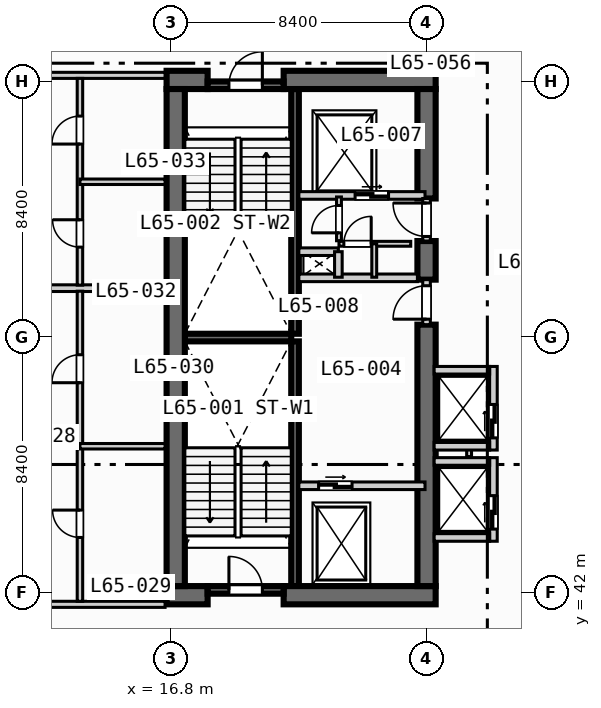
"""IFC4 building model, lengths in metres.
Left out: names, types, materials, properties, quantities, classifications, styles, units other than length and angle.
Written with IfcOpenShell. Run it as: python <this file> out.ifc"""

import sys

from ifc_helpers import new_model, si_unit, direction, frame, frame_2d, origin, place, context, subcontext, project, spatial, rectangle, extrude, element, fill, save


model = new_model("IFC4")
c1 = context("Model", 3, precision=1e-05, world=origin(), true_north=direction((0.0, 1.0)))
c2 = subcontext(c1, "Body", "Model", "MODEL_VIEW")
j1 = project(units=[si_unit("LENGTHUNIT", "METRE"), si_unit("PLANEANGLEUNIT", "RADIAN")], contexts=[c1])
p1 = place(None, origin())
s1 = spatial("IfcSite", under=j1, at=p1, CompositionType="ELEMENT")
p2 = place(p1, origin())
s2 = spatial("IfcBuilding", under=s1, at=p2, CompositionType="ELEMENT")
p3 = place(p2, frame((0.0, 0.0, 263.8)))
s3 = spatial("IfcBuildingStorey", under=s2, at=p3, CompositionType="ELEMENT", Elevation=263.8)
for number, where, z_axis, x_axis in (
    (1, (20.875, 42.2, 0.0), (0.0, 0.0, 1.0), (0.0, 1.0, 0.0)),
    (2, (20.875, 50.5, 0.0), (0.0, 0.0, 1.0), (0.0, 1.0, 0.0)),
):
    element("IfcWall", number, at=place(p3, frame(where, z_axis=z_axis, x_axis=x_axis)), inside=s3, PredefinedType="SOLIDWALL", context=c2, shape_type="SweptSolid", body=[
        extrude(rectangle(XDim=8.05, YDim=0.25, at=frame_2d((4.025, 0.0))), origin(), (0.0, 0.0, 1.0), 3.47),
    ])
p4 = place(p3, frame((17.25, 50.375, 0.0), z_axis=(0.0, 0.0, 1.0), x_axis=(1.0, 0.0, 0.0)))
e3 = element("IfcWall", 3, at=p4, inside=s3, PredefinedType="SOLIDWALL", context=c2, shape_type="SweptSolid", body=[
    extrude(rectangle(XDim=3.5, YDim=0.25, at=frame_2d((1.75, 0.0))), origin(), (0.0, 0.0, 1.0), 3.47),
])
p5 = place(p3, frame((16.65, 41.9, 0.0), z_axis=(0.0, 0.0, 1.0), x_axis=(1.0, 0.0, 0.0)))
e4 = element("IfcWall", 4, at=p5, inside=s3, PredefinedType="SHEAR", context=c2, shape_type="SweptSolid", body=[
    extrude(rectangle(XDim=1.35, YDim=0.6, at=frame_2d((0.675, 0.0))), origin(), (0.0, 0.0, 1.0), 3.47),
])
p6 = place(p3, frame((20.5, 41.9, 0.0), z_axis=(0.0, 0.0, 1.0), x_axis=(1.0, 0.0, 0.0)))
e5 = element("IfcWall", 5, at=p6, inside=s3, PredefinedType="SHEAR", context=c2, shape_type="SweptSolid", body=[
    extrude(rectangle(XDim=5.0, YDim=0.6, at=frame_2d((2.5, 0.0))), origin(), (0.0, 0.0, 1.0), 3.47),
])
p7 = place(p3, frame((16.65, 58.85, 0.0), z_axis=(0.0, 0.0, 1.0), x_axis=(1.0, 0.0, 0.0)))
e6 = element("IfcWall", 6, at=p7, inside=s3, PredefinedType="SHEAR", context=c2, shape_type="SweptSolid", body=[
    extrude(rectangle(XDim=1.35, YDim=0.6, at=frame_2d((0.675, 0.0))), origin(), (0.0, 0.0, 1.0), 3.47),
])
p8 = place(p3, frame((20.5, 58.85, 0.0), z_axis=(0.0, 0.0, 1.0), x_axis=(1.0, 0.0, 0.0)))
e7 = element("IfcWall", 7, at=p8, inside=s3, PredefinedType="SHEAR", context=c2, shape_type="SweptSolid", body=[
    extrude(rectangle(XDim=5.0, YDim=0.6, at=frame_2d((2.5, 0.0))), origin(), (0.0, 0.0, 1.0), 3.47),
])
p9 = place(p3, frame((16.95, 42.2, 0.0), z_axis=(0.0, 0.0, 1.0), x_axis=(0.0, 1.0, 0.0)))
e8 = element("IfcWall", 8, at=p9, inside=s3, PredefinedType="SHEAR", context=c2, shape_type="SweptSolid", body=[
    extrude(rectangle(XDim=16.35, YDim=0.6, at=frame_2d((8.175, 0.0))), origin(), (0.0, 0.0, 1.0), 3.47),
])
p10 = place(p3, frame((25.2, 42.2, 0.0), z_axis=(0.0, 0.0, 1.0), x_axis=(0.0, 1.0, 0.0)))
e9 = element("IfcWall", 9, at=p10, inside=s3, PredefinedType="SHEAR", context=c2, shape_type="SweptSolid", body=[
    extrude(rectangle(XDim=8.6, YDim=0.6, at=frame_2d((4.3, 0.0))), origin(), (0.0, 0.0, 1.0), 3.47),
])
p11 = place(p3, frame((25.2, 52.28, 0.0), z_axis=(0.0, 0.0, 1.0), x_axis=(0.0, 1.0, 0.0)))
e10 = element("IfcWall", 10, at=p11, inside=s3, PredefinedType="SHEAR", context=c2, shape_type="SweptSolid", body=[
    extrude(rectangle(XDim=1.27, YDim=0.6, at=frame_2d((0.635, 0.0))), origin(), (0.0, 0.0, 1.0), 3.47),
])
p12 = place(p3, frame((25.2, 54.95, 0.0), z_axis=(0.0, 0.0, 1.0), x_axis=(0.0, 1.0, 0.0)))
e11 = element("IfcWall", 11, at=p12, inside=s3, PredefinedType="SHEAR", context=c2, shape_type="SweptSolid", body=[
    extrude(rectangle(XDim=3.6, YDim=0.6, at=frame_2d((1.8, 0.0))), origin(), (0.0, 0.0, 1.0), 3.47),
])
p13 = place(p3, frame((18.0, 42.075, 0.0), z_axis=(0.0, 0.0, 1.0), x_axis=(1.0, 0.0, 0.0)))
e12 = element("IfcWall", 12, at=p13, inside=s3, PredefinedType="SOLIDWALL", context=c2, shape_type="SweptSolid", body=[
    extrude(rectangle(XDim=2.5, YDim=0.25, at=frame_2d((1.25, 0.0))), origin(), (0.0, 0.0, 1.0), 3.47),
])
p14 = place(p13, frame((0.7, 0.0, 0.0)))
e13 = element("IfcOpeningElement", 13, at=p14, cuts=e12, PredefinedType="OPENING", context=c2, shape_type="SweptSolid", body=[
    extrude(rectangle(XDim=1.1, YDim=2.15, at=frame_2d((0.55, 1.075))), frame((0.0, 0.135, 0.0), z_axis=(0.0, -1.0, 0.0), x_axis=(1.0, 0.0, 0.0)), (0.0, 0.0, 1.0), 0.27),
])
p15 = place(p3, frame((18.0, 58.675, 0.0), z_axis=(0.0, 0.0, 1.0), x_axis=(1.0, 0.0, 0.0)))
e14 = element("IfcWall", 14, at=p15, inside=s3, PredefinedType="SOLIDWALL", context=c2, shape_type="SweptSolid", body=[
    extrude(rectangle(XDim=2.5, YDim=0.25, at=frame_2d((1.25, 0.0))), origin(), (0.0, 0.0, 1.0), 3.47),
])
p16 = place(p15, frame((0.7, 0.0, 0.0)))
e15 = element("IfcOpeningElement", 15, at=p16, cuts=e14, PredefinedType="OPENING", context=c2, shape_type="SweptSolid", body=[
    extrude(rectangle(XDim=1.1, YDim=2.15, at=frame_2d((0.55, 1.075))), frame((0.0, 0.135, 0.0), z_axis=(0.0, -1.0, 0.0), x_axis=(1.0, 0.0, 0.0)), (0.0, 0.0, 1.0), 0.27),
])
p17 = place(p3, frame((21.0, 45.5, 0.0), z_axis=(0.0, 0.0, 1.0), x_axis=(1.0, 0.0, 0.0)))
e16 = element("IfcWall", 16, at=p17, inside=s3, PredefinedType="SOLIDWALL", context=c2, shape_type="SweptSolid", body=[
    extrude(rectangle(XDim=4.15, YDim=0.25, at=frame_2d((2.075, 0.0))), origin(), (0.0, 0.0, 1.0), 3.47),
])
p18 = place(p17, frame((0.65, 0.0, 0.0)))
e17 = element("IfcOpeningElement", 17, at=p18, cuts=e16, PredefinedType="OPENING", context=c2, shape_type="SweptSolid", body=[
    extrude(rectangle(XDim=1.1, YDim=2.15, at=frame_2d((0.55, 1.075))), frame((0.0, 0.135, 0.0), z_axis=(0.0, -1.0, 0.0), x_axis=(1.0, 0.0, 0.0)), (0.0, 0.0, 1.0), 0.27),
])
p19 = place(p3, frame((25.2, 50.8, 0.0), z_axis=(0.0, 0.0, 1.0), x_axis=(0.0, 1.0, 0.0)))
e18 = element("IfcWall", 18, at=p19, inside=s3, PredefinedType="SOLIDWALL", context=c2, shape_type="SweptSolid", body=[
    extrude(rectangle(XDim=1.48, YDim=0.25, at=frame_2d((0.74, 0.0))), origin(), (0.0, 0.0, 1.0), 3.47),
])
p20 = place(p19, frame((0.18, 0.0, 0.0)))
e19 = element("IfcOpeningElement", 19, at=p20, cuts=e18, PredefinedType="OPENING", context=c2, shape_type="SweptSolid", body=[
    extrude(rectangle(XDim=1.1, YDim=2.15, at=frame_2d((0.55, 1.075))), frame((0.0, 0.135, 0.0), z_axis=(0.0, -1.0, 0.0), x_axis=(1.0, 0.0, 0.0)), (0.0, 0.0, 1.0), 0.27),
])
p21 = place(p3, frame((21.0, 52.34, 0.0), z_axis=(0.0, 0.0, 1.0), x_axis=(1.0, 0.0, 0.0)))
e20 = element("IfcWall", 20, at=p21, inside=s3, PredefinedType="SOLIDWALL", context=c2, shape_type="SweptSolid", body=[
    extrude(rectangle(XDim=3.9, YDim=0.25, at=frame_2d((1.95, 0.0))), origin(), (0.0, 0.0, 1.0), 3.47),
])
p22 = place(p3, frame((21.0, 55.05, 0.0), z_axis=(0.0, 0.0, 1.0), x_axis=(1.0, 0.0, 0.0)))
e21 = element("IfcWall", 21, at=p22, inside=s3, PredefinedType="SOLIDWALL", context=c2, shape_type="SweptSolid", body=[
    extrude(rectangle(XDim=4.15, YDim=0.25, at=frame_2d((2.075, 0.0))), origin(), (0.0, 0.0, 1.0), 3.47),
])
p23 = place(p22, frame((1.85, 0.0, 0.0)))
e22 = element("IfcOpeningElement", 22, at=p23, cuts=e21, PredefinedType="OPENING", context=c2, shape_type="SweptSolid", body=[
    extrude(rectangle(XDim=1.1, YDim=2.15, at=frame_2d((0.55, 1.075))), frame((0.0, 0.135, 0.0), z_axis=(0.0, -1.0, 0.0), x_axis=(1.0, 0.0, 0.0)), (0.0, 0.0, 1.0), 0.27),
])
p24 = place(p3, frame((25.2, 53.55, 0.0), z_axis=(0.0, 0.0, 1.0), x_axis=(0.0, 1.0, 0.0)))
e23 = element("IfcWall", 23, at=p24, inside=s3, PredefinedType="SOLIDWALL", context=c2, shape_type="SweptSolid", body=[
    extrude(rectangle(XDim=1.4, YDim=0.25, at=frame_2d((0.7, 0.0))), origin(), (0.0, 0.0, 1.0), 3.47),
])
p25 = place(p24, frame((0.15, 0.0, 0.0)))
e24 = element("IfcOpeningElement", 24, at=p25, cuts=e23, PredefinedType="OPENING", context=c2, shape_type="SweptSolid", body=[
    extrude(rectangle(XDim=1.1, YDim=2.15, at=frame_2d((0.55, 1.075))), frame((0.0, 0.135, 0.0), z_axis=(0.0, -1.0, 0.0), x_axis=(1.0, 0.0, 0.0)), (0.0, 0.0, 1.0), 0.27),
])
p26 = place(p3, frame((21.0, 53.2, 0.0), z_axis=(0.0, 0.0, 1.0), x_axis=(1.0, 0.0, 0.0)))
e25 = element("IfcWall", 25, at=p26, inside=s3, PredefinedType="SOLIDWALL", context=c2, shape_type="SweptSolid", body=[
    extrude(rectangle(XDim=1.3, YDim=0.25, at=frame_2d((0.65, 0.0))), origin(), (0.0, 0.0, 1.0), 3.47),
])
p27 = place(p3, frame((22.3, 52.36, 0.0), z_axis=(0.0, 0.0, 1.0), x_axis=(0.0, 1.0, 0.0)))
e26 = element("IfcWall", 26, at=p27, inside=s3, PredefinedType="SOLIDWALL", context=c2, shape_type="SweptSolid", body=[
    extrude(rectangle(XDim=0.84, YDim=0.25, at=frame_2d((0.42, 0.0))), origin(), (0.0, 0.0, 1.0), 3.47),
])
p28 = place(p3, frame((22.32, 53.56, 0.0), z_axis=(0.0, 0.0, 1.0), x_axis=(0.0, 1.0, 0.0)))
e27 = element("IfcWall", 27, at=p28, inside=s3, PredefinedType="PARTITIONING", context=c2, shape_type="SweptSolid", body=[
    extrude(rectangle(XDim=1.44, YDim=0.16, at=frame_2d((0.72, 0.0))), origin(), (0.0, 0.0, 1.0), 3.47),
])
p29 = place(p28, frame((0.26, 0.0, 0.0)))
e28 = element("IfcOpeningElement", 28, at=p29, cuts=e27, PredefinedType="OPENING", context=c2, shape_type="SweptSolid", body=[
    extrude(rectangle(XDim=0.9, YDim=2.1, at=frame_2d((0.45, 1.05))), frame((0.0, 0.09, 0.0), z_axis=(0.0, -1.0, 0.0), x_axis=(1.0, 0.0, 0.0)), (0.0, 0.0, 1.0), 0.18),
])
p30 = place(p3, frame((22.32, 53.46, 0.0), z_axis=(0.0, 0.0, 1.0), x_axis=(1.0, 0.0, 0.0)))
e29 = element("IfcWall", 29, at=p30, inside=s3, PredefinedType="PARTITIONING", context=c2, shape_type="SweptSolid", body=[
    extrude(rectangle(XDim=2.36, YDim=0.16, at=frame_2d((1.18, 0.0))), origin(), (0.0, 0.0, 1.0), 3.47),
])
p31 = place(p30, frame((0.16, 0.0, 0.0)))
e30 = element("IfcOpeningElement", 30, at=p31, cuts=e29, PredefinedType="OPENING", context=c2, shape_type="SweptSolid", body=[
    extrude(rectangle(XDim=0.9, YDim=2.1, at=frame_2d((0.45, 1.05))), frame((0.0, 0.09, 0.0), z_axis=(0.0, -1.0, 0.0), x_axis=(1.0, 0.0, 0.0)), (0.0, 0.0, 1.0), 0.18),
])
p32 = place(p3, frame((23.48, 52.36, 0.0), z_axis=(0.0, 0.0, 1.0), x_axis=(0.0, 1.0, 0.0)))
e31 = element("IfcWall", 31, at=p32, inside=s3, PredefinedType="PARTITIONING", context=c2, shape_type="SweptSolid", body=[
    extrude(rectangle(XDim=1.1, YDim=0.16, at=frame_2d((0.55, 0.0))), origin(), (0.0, 0.0, 1.0), 3.47),
])
p33 = place(p3, frame((27.4, 43.675, 0.0), z_axis=(0.0, 0.0, 1.0), x_axis=(0.0, 1.0, 0.0)))
e32 = element("IfcWall", 32, at=p33, inside=s3, PredefinedType="SOLIDWALL", context=c2, shape_type="SweptSolid", body=[
    extrude(rectangle(XDim=2.75, YDim=0.25, at=frame_2d((1.375, 0.0))), origin(), (0.0, 0.0, 1.0), 3.47),
])
p34 = place(p33, frame((0.4, 0.0, 0.0)))
e33 = element("IfcOpeningElement", 33, at=p34, cuts=e32, PredefinedType="OPENING", context=c2, shape_type="SweptSolid", body=[
    extrude(rectangle(XDim=1.1, YDim=2.15, at=frame_2d((0.55, 1.075))), frame((0.0, 0.135, 0.0), z_axis=(0.0, -1.0, 0.0), x_axis=(1.0, 0.0, 0.0)), (0.0, 0.0, 1.0), 0.27),
])
for number, where, z_axis, x_axis in (
    (34, (25.45, 43.8, 0.0), (0.0, 0.0, 1.0), (1.0, 0.0, 0.0)),
    (35, (25.45, 46.3, 0.0), (0.0, 0.0, 1.0), (1.0, 0.0, 0.0)),
):
    element("IfcWall", number, at=place(p3, frame(where, z_axis=z_axis, x_axis=x_axis)), inside=s3, PredefinedType="SOLIDWALL", context=c2, shape_type="SweptSolid", body=[
        extrude(rectangle(XDim=1.825, YDim=0.25, at=frame_2d((0.913, 0.0))), origin(), (0.0, 0.0, 1.0), 3.47),
    ])
p35 = place(p3, frame((26.6, 46.46, 0.0), z_axis=(0.0, 0.0, 1.0), x_axis=(0.0, 1.0, 0.0)))
e36 = element("IfcWall", 36, at=p35, inside=s3, PredefinedType="PARTITIONING", context=c2, shape_type="SweptSolid", body=[
    extrude(rectangle(XDim=0.88, YDim=0.16, at=frame_2d((0.44, 0.0))), origin(), (0.0, 0.0, 1.0), 3.47),
])
p36 = place(p3, frame((27.4, 46.675, 0.0), z_axis=(0.0, 0.0, 1.0), x_axis=(0.0, 1.0, 0.0)))
e37 = element("IfcWall", 37, at=p36, inside=s3, PredefinedType="SOLIDWALL", context=c2, shape_type="SweptSolid", body=[
    extrude(rectangle(XDim=2.75, YDim=0.25, at=frame_2d((1.375, 0.0))), origin(), (0.0, 0.0, 1.0), 3.47),
])
p37 = place(p36, frame((0.4, 0.0, 0.0)))
e38 = element("IfcOpeningElement", 38, at=p37, cuts=e37, PredefinedType="OPENING", context=c2, shape_type="SweptSolid", body=[
    extrude(rectangle(XDim=1.1, YDim=2.15, at=frame_2d((0.55, 1.075))), frame((0.0, 0.135, 0.0), z_axis=(0.0, -1.0, 0.0), x_axis=(1.0, 0.0, 0.0)), (0.0, 0.0, 1.0), 0.27),
])
for number, where, z_axis, x_axis in (
    (39, (25.45, 46.8, 0.0), (0.0, 0.0, 1.0), (1.0, 0.0, 0.0)),
    (40, (25.45, 49.3, 0.0), (0.0, 0.0, 1.0), (1.0, 0.0, 0.0)),
):
    element("IfcWall", number, at=place(p3, frame(where, z_axis=z_axis, x_axis=x_axis)), inside=s3, PredefinedType="SOLIDWALL", context=c2, shape_type="SweptSolid", body=[
        extrude(rectangle(XDim=1.825, YDim=0.25, at=frame_2d((0.913, 0.0))), origin(), (0.0, 0.0, 1.0), 3.47),
    ])
p38 = place(p3, frame((8.65, 41.6, 0.0), z_axis=(0.0, 0.0, 1.0), x_axis=(1.0, 0.0, 0.0)))
e41 = element("IfcWall", 41, at=p38, inside=s3, PredefinedType="PARTITIONING", context=c2, shape_type="SweptSolid", body=[
    extrude(rectangle(XDim=7.95, YDim=0.2, at=frame_2d((3.975, 0.0))), origin(), (0.0, 0.0, 1.0), 3.47),
])
p39 = place(p38, frame((2.0, 0.0, 0.0)))
e42 = element("IfcOpeningElement", 42, at=p39, cuts=e41, PredefinedType="OPENING", context=c2, shape_type="SweptSolid", body=[
    extrude(rectangle(XDim=1.0, YDim=2.15, at=frame_2d((0.5, 1.075))), frame((0.0, 0.11, 0.0), z_axis=(0.0, -1.0, 0.0), x_axis=(1.0, 0.0, 0.0)), (0.0, 0.0, 1.0), 0.22),
])
p40 = place(p3, frame((8.65, 59.0, 0.0), z_axis=(0.0, 0.0, 1.0), x_axis=(1.0, 0.0, 0.0)))
e43 = element("IfcWall", 43, at=p40, inside=s3, PredefinedType="PARTITIONING", context=c2, shape_type="SweptSolid", body=[
    extrude(rectangle(XDim=7.95, YDim=0.2, at=frame_2d((3.975, 0.0))), origin(), (0.0, 0.0, 1.0), 3.007),
])
p41 = place(p40, frame((2.0, 0.0, 0.0)))
e44 = element("IfcOpeningElement", 44, at=p41, cuts=e43, PredefinedType="OPENING", context=c2, shape_type="SweptSolid", body=[
    extrude(rectangle(XDim=1.0, YDim=2.15, at=frame_2d((0.5, 1.075))), frame((0.0, 0.11, 0.0), z_axis=(0.0, -1.0, 0.0), x_axis=(1.0, 0.0, 0.0)), (0.0, 0.0, 1.0), 0.22),
])
p42 = place(p3, frame((8.65, 52.0, 0.0), z_axis=(0.0, 0.0, 1.0), x_axis=(1.0, 0.0, 0.0)))
e45 = element("IfcWall", 45, at=p42, inside=s3, PredefinedType="PARTITIONING", context=c2, shape_type="SweptSolid", body=[
    extrude(rectangle(XDim=7.95, YDim=0.22, at=frame_2d((3.975, 0.0))), origin(), (0.0, 0.0, 1.0), 3.47),
])
p43 = place(p3, frame((13.8, 41.7, 0.0), z_axis=(0.0, 0.0, 1.0), x_axis=(0.0, 1.0, 0.0)))
e46 = element("IfcWall", 46, at=p43, inside=s3, PredefinedType="PLUMBINGWALL", context=c2, shape_type="SweptSolid", body=[
    extrude(rectangle(XDim=10.2, YDim=0.18, at=frame_2d((5.1, 0.0))), origin(), (0.0, 0.0, 1.0), 3.47),
])
p44 = place(p43, frame((2.1, 0.0, 0.0)))
e47 = element("IfcOpeningElement", 47, at=p44, cuts=e46, PredefinedType="OPENING", context=c2, shape_type="SweptSolid", body=[
    extrude(rectangle(XDim=0.9, YDim=2.1, at=frame_2d((0.45, 1.05))), frame((0.0, 0.1, 0.0), z_axis=(0.0, -1.0, 0.0), x_axis=(1.0, 0.0, 0.0)), (0.0, 0.0, 1.0), 0.2),
])
p45 = place(p43, frame((7.19, 0.0, 0.0)))
e48 = element("IfcOpeningElement", 48, at=p45, cuts=e46, PredefinedType="OPENING", context=c2, shape_type="SweptSolid", body=[
    extrude(rectangle(XDim=0.92, YDim=2.1, at=frame_2d((0.46, 1.05))), frame((0.0, 0.1, 0.0), z_axis=(0.0, -1.0, 0.0), x_axis=(1.0, 0.0, 0.0)), (0.0, 0.0, 1.0), 0.2),
])
p46 = place(p3, frame((13.8, 46.8, 0.0), z_axis=(0.0, 0.0, 1.0), x_axis=(1.0, 0.0, 0.0)))
e49 = element("IfcWall", 49, at=p46, inside=s3, PredefinedType="PLUMBINGWALL", context=c2, shape_type="SweptSolid", body=[
    extrude(rectangle(XDim=2.8, YDim=0.18, at=frame_2d((1.4, 0.0))), origin(), (0.0, 0.0, 1.0), 3.47),
])
p47 = place(p3, frame((13.8, 52.1, 0.0), z_axis=(0.0, 0.0, 1.0), x_axis=(0.0, 1.0, 0.0)))
e50 = element("IfcWall", 50, at=p47, inside=s3, PredefinedType="PLUMBINGWALL", context=c2, shape_type="SweptSolid", body=[
    extrude(rectangle(XDim=6.8, YDim=0.18, at=frame_2d((3.4, 0.0))), origin(), (0.0, 0.0, 1.0), 3.47),
])
p48 = place(p47, frame((1.25, 0.0, 0.0)))
e51 = element("IfcOpeningElement", 51, at=p48, cuts=e50, PredefinedType="OPENING", context=c2, shape_type="SweptSolid", body=[
    extrude(rectangle(XDim=0.9, YDim=2.1, at=frame_2d((0.45, 1.05))), frame((0.0, 0.1, 0.0), z_axis=(0.0, -1.0, 0.0), x_axis=(1.0, 0.0, 0.0)), (0.0, 0.0, 1.0), 0.2),
])
p49 = place(p47, frame((4.64, 0.0, 0.0)))
e52 = element("IfcOpeningElement", 52, at=p49, cuts=e50, PredefinedType="OPENING", context=c2, shape_type="SweptSolid", body=[
    extrude(rectangle(XDim=0.92, YDim=2.1, at=frame_2d((0.46, 1.05))), frame((0.0, 0.1, 0.0), z_axis=(0.0, -1.0, 0.0), x_axis=(1.0, 0.0, 0.0)), (0.0, 0.0, 1.0), 0.2),
])
p50 = place(p3, frame((13.8, 55.5, 0.0), z_axis=(0.0, 0.0, 1.0), x_axis=(1.0, 0.0, 0.0)))
e53 = element("IfcWall", 53, at=p50, inside=s3, PredefinedType="PLUMBINGWALL", context=c2, shape_type="SweptSolid", body=[
    extrude(rectangle(XDim=2.8, YDim=0.18, at=frame_2d((1.4, 0.0))), origin(), (0.0, 0.0, 1.0), 3.47),
])
p51 = place(p14, origin())
e54 = element("IfcDoor", 54, at=p51, inside=s3, OperationType="SINGLE_SWING_LEFT", PredefinedType="DOOR", context=c2, shape_type="SweptSolid", body=[
    extrude(rectangle(XDim=1.1, YDim=2.15, at=frame_2d((0.55, 1.075))), frame((0.0, 0.025, 0.0), z_axis=(0.0, -1.0, 0.0), x_axis=(1.0, 0.0, 0.0)), (0.0, 0.0, 1.0), 0.05),
])
fill(e13, e54)
p52 = place(p16, origin())
e55 = element("IfcDoor", 55, at=p52, inside=s3, OperationType="SINGLE_SWING_RIGHT", PredefinedType="DOOR", context=c2, shape_type="SweptSolid", body=[
    extrude(rectangle(XDim=1.1, YDim=2.15, at=frame_2d((0.55, 1.075))), frame((0.0, 0.025, 0.0), z_axis=(0.0, -1.0, 0.0), x_axis=(1.0, 0.0, 0.0)), (0.0, 0.0, 1.0), 0.05),
])
fill(e15, e55)
p53 = place(p18, origin())
e56 = element("IfcDoor", 56, at=p53, inside=s3, OperationType="SLIDING_TO_LEFT", PredefinedType="DOOR", context=c2, shape_type="SweptSolid", body=[
    extrude(rectangle(XDim=1.1, YDim=2.15, at=frame_2d((0.55, 1.075))), frame((0.0, 0.025, 0.0), z_axis=(0.0, -1.0, 0.0), x_axis=(1.0, 0.0, 0.0)), (0.0, 0.0, 1.0), 0.05),
])
fill(e17, e56)
p54 = place(p20, origin())
e57 = element("IfcDoor", 57, at=p54, inside=s3, OperationType="SINGLE_SWING_LEFT", PredefinedType="DOOR", context=c2, shape_type="SweptSolid", body=[
    extrude(rectangle(XDim=1.1, YDim=2.15, at=frame_2d((0.55, 1.075))), frame((0.0, 0.025, 0.0), z_axis=(0.0, -1.0, 0.0), x_axis=(1.0, 0.0, 0.0)), (0.0, 0.0, 1.0), 0.05),
])
fill(e19, e57)
p55 = place(p23, origin())
e58 = element("IfcDoor", 58, at=p55, inside=s3, OperationType="SLIDING_TO_LEFT", PredefinedType="DOOR", context=c2, shape_type="SweptSolid", body=[
    extrude(rectangle(XDim=1.1, YDim=2.15, at=frame_2d((0.55, 1.075))), frame((0.0, 0.025, 0.0), z_axis=(0.0, -1.0, 0.0), x_axis=(1.0, 0.0, 0.0)), (0.0, 0.0, 1.0), 0.05),
])
fill(e22, e58)
p56 = place(p25, origin())
e59 = element("IfcDoor", 59, at=p56, inside=s3, OperationType="SINGLE_SWING_RIGHT", PredefinedType="DOOR", context=c2, shape_type="SweptSolid", body=[
    extrude(rectangle(XDim=1.1, YDim=2.15, at=frame_2d((0.55, 1.075))), frame((0.0, 0.025, 0.0), z_axis=(0.0, -1.0, 0.0), x_axis=(1.0, 0.0, 0.0)), (0.0, 0.0, 1.0), 0.05),
])
fill(e24, e59)
p57 = place(p29, origin())
e60 = element("IfcDoor", 60, at=p57, inside=s3, OperationType="SINGLE_SWING_LEFT", PredefinedType="DOOR", context=c2, shape_type="SweptSolid", body=[
    extrude(rectangle(XDim=0.9, YDim=2.1, at=frame_2d((0.45, 1.05))), frame((0.0, 0.025, 0.0), z_axis=(0.0, -1.0, 0.0), x_axis=(1.0, 0.0, 0.0)), (0.0, 0.0, 1.0), 0.05),
])
fill(e28, e60)
p58 = place(p31, origin())
e61 = element("IfcDoor", 61, at=p58, inside=s3, OperationType="SINGLE_SWING_RIGHT", PredefinedType="DOOR", context=c2, shape_type="SweptSolid", body=[
    extrude(rectangle(XDim=0.9, YDim=2.1, at=frame_2d((0.45, 1.05))), frame((0.0, 0.025, 0.0), z_axis=(0.0, -1.0, 0.0), x_axis=(1.0, 0.0, 0.0)), (0.0, 0.0, 1.0), 0.05),
])
fill(e30, e61)
p59 = place(p34, origin())
e62 = element("IfcDoor", 62, at=p59, inside=s3, OperationType="SLIDING_TO_LEFT", PredefinedType="DOOR", context=c2, shape_type="SweptSolid", body=[
    extrude(rectangle(XDim=1.1, YDim=2.15, at=frame_2d((0.55, 1.075))), frame((0.0, 0.025, 0.0), z_axis=(0.0, -1.0, 0.0), x_axis=(1.0, 0.0, 0.0)), (0.0, 0.0, 1.0), 0.05),
])
fill(e33, e62)
p60 = place(p37, origin())
e63 = element("IfcDoor", 63, at=p60, inside=s3, OperationType="SLIDING_TO_LEFT", PredefinedType="DOOR", context=c2, shape_type="SweptSolid", body=[
    extrude(rectangle(XDim=1.1, YDim=2.15, at=frame_2d((0.55, 1.075))), frame((0.0, 0.025, 0.0), z_axis=(0.0, -1.0, 0.0), x_axis=(1.0, 0.0, 0.0)), (0.0, 0.0, 1.0), 0.05),
])
fill(e38, e63)
p61 = place(p44, origin())
e64 = element("IfcDoor", 64, at=p61, inside=s3, OperationType="SINGLE_SWING_RIGHT", PredefinedType="DOOR", context=c2, shape_type="SweptSolid", body=[
    extrude(rectangle(XDim=0.9, YDim=2.1, at=frame_2d((0.45, 1.05))), frame((0.0, 0.025, 0.0), z_axis=(0.0, -1.0, 0.0), x_axis=(1.0, 0.0, 0.0)), (0.0, 0.0, 1.0), 0.05),
])
fill(e47, e64)
p62 = place(p45, origin())
e65 = element("IfcDoor", 65, at=p62, inside=s3, OperationType="SINGLE_SWING_LEFT", PredefinedType="DOOR", context=c2, shape_type="SweptSolid", body=[
    extrude(rectangle(XDim=0.92, YDim=2.1, at=frame_2d((0.46, 1.05))), frame((0.0, 0.025, 0.0), z_axis=(0.0, -1.0, 0.0), x_axis=(1.0, 0.0, 0.0)), (0.0, 0.0, 1.0), 0.05),
])
fill(e48, e65)
p63 = place(p48, origin())
e66 = element("IfcDoor", 66, at=p63, inside=s3, OperationType="SINGLE_SWING_RIGHT", PredefinedType="DOOR", context=c2, shape_type="SweptSolid", body=[
    extrude(rectangle(XDim=0.9, YDim=2.1, at=frame_2d((0.45, 1.05))), frame((0.0, 0.025, 0.0), z_axis=(0.0, -1.0, 0.0), x_axis=(1.0, 0.0, 0.0)), (0.0, 0.0, 1.0), 0.05),
])
fill(e51, e66)
p64 = place(p49, origin())
e67 = element("IfcDoor", 67, at=p64, inside=s3, OperationType="SINGLE_SWING_LEFT", PredefinedType="DOOR", context=c2, shape_type="SweptSolid", body=[
    extrude(rectangle(XDim=0.92, YDim=2.1, at=frame_2d((0.46, 1.05))), frame((0.0, 0.025, 0.0), z_axis=(0.0, -1.0, 0.0), x_axis=(1.0, 0.0, 0.0)), (0.0, 0.0, 1.0), 0.05),
])
fill(e52, e67)
save(model, sys.argv[1])
